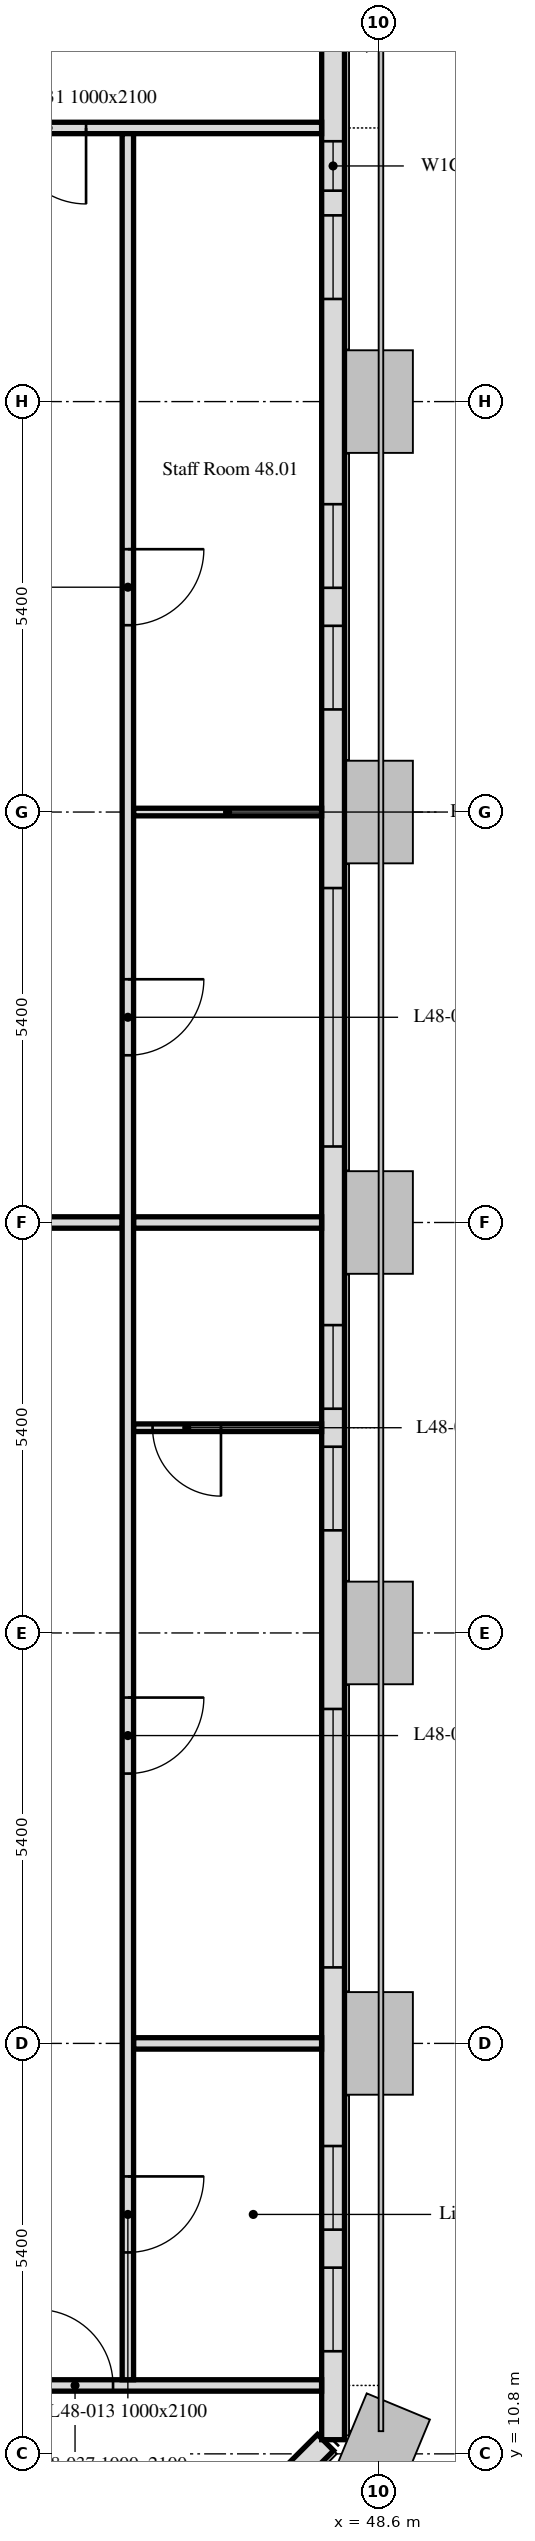
"""IFC4 building model, lengths in metres.
Left out: names, types, materials, properties, quantities, classifications, styles, units other than length and angle.
Written with IfcOpenShell. Run it as: python <this file> out.ifc"""

import sys

from ifc_helpers import new_model, si_unit, direction, frame, frame_2d, origin, place, context, subcontext, project, spatial, rectangle, extrude, element, fill, save


model = new_model("IFC4")
c1 = context("Model", 3, precision=1e-05, world=origin(), true_north=direction((0.0, 1.0)))
c2 = subcontext(c1, "Body", "Model", "MODEL_VIEW")
j1 = project(units=[si_unit("LENGTHUNIT", "METRE"), si_unit("PLANEANGLEUNIT", "RADIAN")], contexts=[c1])
p1 = place(None, origin())
s1 = spatial("IfcSite", under=j1, at=p1, CompositionType="ELEMENT")
p2 = place(p1, origin())
s2 = spatial("IfcBuilding", under=s1, at=p2, CompositionType="ELEMENT")
p3 = place(p2, frame((0.0, 0.0, 197.2)))
s3 = spatial("IfcBuildingStorey", under=s2, at=p3, CompositionType="ELEMENT", Elevation=197.2)
p4 = place(p3, frame((43.051, 6.099, 0.0), z_axis=(0.0, 0.0, 1.0), x_axis=(0.707106781187, 0.707106781187, 0.0)))
e1 = element("IfcWall", 1, at=p4, inside=s3, PredefinedType="SOLIDWALL", context=c2, shape_type="SweptSolid", body=[
    extrude(rectangle(XDim=6.86, YDim=0.3, at=frame_2d((3.43, 0.0))), origin(), (0.0, 0.0, 1.0), 3.0),
])
p5 = place(p4, frame((1.28, 0.0, 0.9)))
e2 = element("IfcOpeningElement", 2, at=p5, cuts=e1, PredefinedType="OPENING", context=c2, shape_type="SweptSolid", body=[
    extrude(rectangle(XDim=1.1, YDim=1.7, at=frame_2d((0.55, 0.85))), frame((0.0, 0.16, 0.0), z_axis=(0.0, -1.0, 0.0), x_axis=(1.0, 0.0, 0.0)), (0.0, 0.0, 1.0), 0.32),
])
p6 = place(p4, frame((4.48, 0.0, 0.9)))
e3 = element("IfcOpeningElement", 3, at=p6, cuts=e1, PredefinedType="OPENING", context=c2, shape_type="SweptSolid", body=[
    extrude(rectangle(XDim=1.1, YDim=1.7, at=frame_2d((0.55, 0.85))), frame((0.0, 0.16, 0.0), z_axis=(0.0, -1.0, 0.0), x_axis=(1.0, 0.0, 0.0)), (0.0, 0.0, 1.0), 0.32),
])
p7 = place(p3, frame((48.0, 10.986, 0.0), z_axis=(0.0, 0.0, 1.0), x_axis=(0.0, 1.0, 0.0)))
e4 = element("IfcWall", 4, at=p7, inside=s3, PredefinedType="SOLIDWALL", context=c2, shape_type="SweptSolid", body=[
    extrude(rectangle(XDim=32.027, YDim=0.3, at=frame_2d((16.014, 0.0))), origin(), (0.0, 0.0, 1.0), 3.0),
])
p8 = place(p7, frame((1.164, 0.0, 0.9)))
e5 = element("IfcOpeningElement", 5, at=p8, cuts=e4, PredefinedType="OPENING", context=c2, shape_type="SweptSolid", body=[
    extrude(rectangle(XDim=1.1, YDim=1.7, at=frame_2d((0.55, 0.85))), frame((0.0, 0.16, 0.0), z_axis=(0.0, -1.0, 0.0), x_axis=(1.0, 0.0, 0.0)), (0.0, 0.0, 1.0), 0.32),
])
p9 = place(p7, frame((2.764, 0.0, 0.9)))
e6 = element("IfcOpeningElement", 6, at=p9, cuts=e4, PredefinedType="OPENING", context=c2, shape_type="SweptSolid", body=[
    extrude(rectangle(XDim=1.1, YDim=1.7, at=frame_2d((0.55, 0.85))), frame((0.0, 0.16, 0.0), z_axis=(0.0, -1.0, 0.0), x_axis=(1.0, 0.0, 0.0)), (0.0, 0.0, 1.0), 0.32),
])
p10 = place(p7, frame((6.214, 0.0, 0.9)))
e7 = element("IfcOpeningElement", 7, at=p10, cuts=e4, PredefinedType="OPENING", context=c2, shape_type="SweptSolid", body=[
    extrude(rectangle(XDim=3.4, YDim=1.7, at=frame_2d((1.7, 0.85))), frame((0.0, 0.16, 0.0), z_axis=(0.0, -1.0, 0.0), x_axis=(1.0, 0.0, 0.0)), (0.0, 0.0, 1.0), 0.32),
])
p11 = place(p7, frame((11.964, 0.0, 0.9)))
e8 = element("IfcOpeningElement", 8, at=p11, cuts=e4, PredefinedType="OPENING", context=c2, shape_type="SweptSolid", body=[
    extrude(rectangle(XDim=1.1, YDim=1.7, at=frame_2d((0.55, 0.85))), frame((0.0, 0.16, 0.0), z_axis=(0.0, -1.0, 0.0), x_axis=(1.0, 0.0, 0.0)), (0.0, 0.0, 1.0), 0.32),
])
p12 = place(p7, frame((13.564, 0.0, 0.9)))
e9 = element("IfcOpeningElement", 9, at=p12, cuts=e4, PredefinedType="OPENING", context=c2, shape_type="SweptSolid", body=[
    extrude(rectangle(XDim=1.1, YDim=1.7, at=frame_2d((0.55, 0.85))), frame((0.0, 0.16, 0.0), z_axis=(0.0, -1.0, 0.0), x_axis=(1.0, 0.0, 0.0)), (0.0, 0.0, 1.0), 0.32),
])
p13 = place(p7, frame((17.014, 0.0, 0.9)))
e10 = element("IfcOpeningElement", 10, at=p13, cuts=e4, PredefinedType="OPENING", context=c2, shape_type="SweptSolid", body=[
    extrude(rectangle(XDim=3.4, YDim=1.7, at=frame_2d((1.7, 0.85))), frame((0.0, 0.16, 0.0), z_axis=(0.0, -1.0, 0.0), x_axis=(1.0, 0.0, 0.0)), (0.0, 0.0, 1.0), 0.32),
])
p14 = place(p7, frame((22.764, 0.0, 0.9)))
e11 = element("IfcOpeningElement", 11, at=p14, cuts=e4, PredefinedType="OPENING", context=c2, shape_type="SweptSolid", body=[
    extrude(rectangle(XDim=1.1, YDim=1.7, at=frame_2d((0.55, 0.85))), frame((0.0, 0.16, 0.0), z_axis=(0.0, -1.0, 0.0), x_axis=(1.0, 0.0, 0.0)), (0.0, 0.0, 1.0), 0.32),
])
p15 = place(p7, frame((24.364, 0.0, 0.9)))
e12 = element("IfcOpeningElement", 12, at=p15, cuts=e4, PredefinedType="OPENING", context=c2, shape_type="SweptSolid", body=[
    extrude(rectangle(XDim=1.1, YDim=1.7, at=frame_2d((0.55, 0.85))), frame((0.0, 0.16, 0.0), z_axis=(0.0, -1.0, 0.0), x_axis=(1.0, 0.0, 0.0)), (0.0, 0.0, 1.0), 0.32),
])
p16 = place(p7, frame((28.164, 0.0, 0.9)))
e13 = element("IfcOpeningElement", 13, at=p16, cuts=e4, PredefinedType="OPENING", context=c2, shape_type="SweptSolid", body=[
    extrude(rectangle(XDim=1.1, YDim=1.7, at=frame_2d((0.55, 0.85))), frame((0.0, 0.16, 0.0), z_axis=(0.0, -1.0, 0.0), x_axis=(1.0, 0.0, 0.0)), (0.0, 0.0, 1.0), 0.32),
])
p17 = place(p7, frame((29.589, 0.0, 0.9)))
e14 = element("IfcOpeningElement", 14, at=p17, cuts=e4, PredefinedType="OPENING", context=c2, shape_type="SweptSolid", body=[
    extrude(rectangle(XDim=0.65, YDim=1.7, at=frame_2d((0.325, 0.85))), frame((0.0, 0.16, 0.0), z_axis=(0.0, -1.0, 0.0), x_axis=(1.0, 0.0, 0.0)), (0.0, 0.0, 1.0), 0.32),
])
p18 = place(p3, frame((45.375, 32.4, 0.0), z_axis=(0.0, 0.0, 1.0), x_axis=(1.0, 0.0, 0.0)))
e15 = element("IfcWall", 15, at=p18, inside=s3, PredefinedType="PARTITIONING", context=c2, shape_type="SweptSolid", body=[
    extrude(rectangle(XDim=2.474, YDim=0.1, at=frame_2d((1.237, 0.0))), origin(), (0.0, 0.0, 1.0), 2.4),
])
p19 = place(p3, frame((47.849, 41.4, 0.0), z_axis=(0.0, 0.0, 1.0), x_axis=(-1.0, 0.0, 0.0)))
e16 = element("IfcWall", 16, at=p19, inside=s3, PredefinedType="PARTITIONING", context=c2, shape_type="SweptSolid", body=[
    extrude(rectangle(XDim=41.698, YDim=0.15, at=frame_2d((20.849, 0.0))), origin(), (0.0, 0.0, 1.0), 2.4),
])
p20 = place(p19, frame((39.249, 0.0, 0.0)))
e17 = element("IfcOpeningElement", 17, at=p20, cuts=e16, PredefinedType="OPENING", context=c2, shape_type="SweptSolid", body=[
    extrude(rectangle(XDim=1.0, YDim=2.1, at=frame_2d((0.5, 1.05))), frame((0.0, 0.075, 0.0), z_axis=(0.0, -1.0, 0.0), x_axis=(1.0, 0.0, 0.0)), (0.0, 0.0, 1.0), 0.15),
])
p21 = place(p19, frame((11.449, 0.0, 0.0)))
e18 = element("IfcOpeningElement", 18, at=p21, cuts=e16, PredefinedType="OPENING", context=c2, shape_type="SweptSolid", body=[
    extrude(rectangle(XDim=1.0, YDim=2.1, at=frame_2d((0.5, 1.05))), frame((0.0, 0.075, 0.0), z_axis=(0.0, -1.0, 0.0), x_axis=(1.0, 0.0, 0.0)), (0.0, 0.0, 1.0), 0.15),
])
p22 = place(p19, frame((3.099, 0.0, 0.0)))
e19 = element("IfcOpeningElement", 19, at=p22, cuts=e16, PredefinedType="OPENING", context=c2, shape_type="SweptSolid", body=[
    extrude(rectangle(XDim=1.0, YDim=2.1, at=frame_2d((0.5, 1.05))), frame((0.0, 0.075, 0.0), z_axis=(0.0, -1.0, 0.0), x_axis=(1.0, 0.0, 0.0)), (0.0, 0.0, 1.0), 0.15),
])
p23 = place(p19, frame((23.049, 0.0, 0.0)))
e20 = element("IfcOpeningElement", 20, at=p23, cuts=e16, PredefinedType="OPENING", context=c2, shape_type="SweptSolid", body=[
    extrude(rectangle(XDim=1.0, YDim=2.1, at=frame_2d((0.5, 1.05))), frame((0.0, 0.075, 0.0), z_axis=(0.0, -1.0, 0.0), x_axis=(1.0, 0.0, 0.0)), (0.0, 0.0, 1.0), 0.15),
])
p24 = place(p3, frame((45.375, 27.0, 0.0), z_axis=(0.0, 0.0, 1.0), x_axis=(1.0, 0.0, 0.0)))
e21 = element("IfcWall", 21, at=p24, inside=s3, PredefinedType="PARTITIONING", context=c2, shape_type="SweptSolid", body=[
    extrude(rectangle(XDim=2.474, YDim=0.15, at=frame_2d((1.237, 0.0))), origin(), (0.0, 0.0, 1.0), 2.4),
])
p25 = place(p3, frame((43.2, 27.0, 0.0), z_axis=(0.0, 0.0, 1.0), x_axis=(1.0, 0.0, 0.0)))
e22 = element("IfcWall", 22, at=p25, inside=s3, PredefinedType="PARTITIONING", context=c2, shape_type="SweptSolid", body=[
    extrude(rectangle(XDim=2.025, YDim=0.15, at=frame_2d((1.013, 0.0))), origin(), (0.0, 0.0, 1.0), 2.4),
])
p26 = place(p3, frame((47.849, 16.2, 0.0), z_axis=(0.0, 0.0, 1.0), x_axis=(-1.0, 0.0, 0.0)))
e23 = element("IfcWall", 23, at=p26, inside=s3, PredefinedType="PARTITIONING", context=c2, shape_type="SweptSolid", body=[
    extrude(rectangle(XDim=2.474, YDim=0.15, at=frame_2d((1.237, 0.0))), origin(), (0.0, 0.0, 1.0), 2.4),
])
p27 = place(p3, frame((6.151, 11.7, 0.0), z_axis=(0.0, 0.0, 1.0), x_axis=(1.0, 0.0, 0.0)))
e24 = element("IfcWall", 24, at=p27, inside=s3, PredefinedType="PARTITIONING", context=c2, shape_type="SweptSolid", body=[
    extrude(rectangle(XDim=41.698, YDim=0.15, at=frame_2d((20.849, 0.0))), origin(), (0.0, 0.0, 1.0), 3.0),
])
p28 = place(p27, frame((17.649, 0.0, 0.0)))
e25 = element("IfcOpeningElement", 25, at=p28, cuts=e24, PredefinedType="OPENING", context=c2, shape_type="SweptSolid", body=[
    extrude(rectangle(XDim=1.0, YDim=2.1, at=frame_2d((0.5, 1.05))), frame((0.0, 0.075, 0.0), z_axis=(0.0, -1.0, 0.0), x_axis=(1.0, 0.0, 0.0)), (0.0, 0.0, 1.0), 0.15),
])
p29 = place(p27, frame((1.449, 0.0, 0.0)))
e26 = element("IfcOpeningElement", 26, at=p29, cuts=e24, PredefinedType="OPENING", context=c2, shape_type="SweptSolid", body=[
    extrude(rectangle(XDim=1.0, YDim=2.1, at=frame_2d((0.5, 1.05))), frame((0.0, 0.075, 0.0), z_axis=(0.0, -1.0, 0.0), x_axis=(1.0, 0.0, 0.0)), (0.0, 0.0, 1.0), 0.15),
])
p30 = place(p27, frame((29.249, 0.0, 0.0)))
e27 = element("IfcOpeningElement", 27, at=p30, cuts=e24, PredefinedType="OPENING", context=c2, shape_type="SweptSolid", body=[
    extrude(rectangle(XDim=1.0, YDim=2.1, at=frame_2d((0.5, 1.05))), frame((0.0, 0.075, 0.0), z_axis=(0.0, -1.0, 0.0), x_axis=(1.0, 0.0, 0.0)), (0.0, 0.0, 1.0), 0.15),
])
p31 = place(p27, frame((37.954, 0.0, 0.0)))
e28 = element("IfcOpeningElement", 28, at=p31, cuts=e24, PredefinedType="OPENING", context=c2, shape_type="SweptSolid", body=[
    extrude(rectangle(XDim=1.0, YDim=2.1, at=frame_2d((0.5, 1.05))), frame((0.0, 0.075, 0.0), z_axis=(0.0, -1.0, 0.0), x_axis=(1.0, 0.0, 0.0)), (0.0, 0.0, 1.0), 0.15),
])
p32 = place(p3, frame((47.849, 24.3, 0.0), z_axis=(0.0, 0.0, 1.0), x_axis=(-1.0, 0.0, 0.0)))
e29 = element("IfcWall", 29, at=p32, inside=s3, PredefinedType="PARTITIONING", context=c2, shape_type="SweptSolid", body=[
    extrude(rectangle(XDim=2.474, YDim=0.1, at=frame_2d((1.237, 0.0))), origin(), (0.0, 0.0, 1.0), 3.0),
])
p33 = place(p32, frame((1.324, 0.0, 0.0)))
e30 = element("IfcOpeningElement", 30, at=p33, cuts=e29, PredefinedType="OPENING", context=c2, shape_type="SweptSolid", body=[
    extrude(rectangle(XDim=0.9, YDim=2.1, at=frame_2d((0.45, 1.05))), frame((0.0, 0.05, 0.0), z_axis=(0.0, -1.0, 0.0), x_axis=(1.0, 0.0, 0.0)), (0.0, 0.0, 1.0), 0.1),
])
p34 = place(p3, frame((45.3, 41.325, 0.0), z_axis=(0.0, 0.0, 1.0), x_axis=(0.0, -1.0, 0.0)))
e31 = element("IfcWall", 31, at=p34, inside=s3, PredefinedType="PARTITIONING", context=c2, shape_type="SweptSolid", body=[
    extrude(rectangle(XDim=29.55, YDim=0.15, at=frame_2d((14.775, 0.0))), origin(), (0.0, 0.0, 1.0), 2.4),
])
p35 = place(p34, frame((5.467, 0.0, 0.0)))
e32 = element("IfcOpeningElement", 32, at=p35, cuts=e31, PredefinedType="OPENING", context=c2, shape_type="SweptSolid", body=[
    extrude(rectangle(XDim=1.0, YDim=2.1, at=frame_2d((0.5, 1.05))), frame((0.0, 0.075, 0.0), z_axis=(0.0, -1.0, 0.0), x_axis=(1.0, 0.0, 0.0)), (0.0, 0.0, 1.0), 0.15),
])
p36 = place(p34, frame((11.125, 0.0, 0.0)))
e33 = element("IfcOpeningElement", 33, at=p36, cuts=e31, PredefinedType="OPENING", context=c2, shape_type="SweptSolid", body=[
    extrude(rectangle(XDim=1.0, YDim=2.1, at=frame_2d((0.5, 1.05))), frame((0.0, 0.075, 0.0), z_axis=(0.0, -1.0, 0.0), x_axis=(1.0, 0.0, 0.0)), (0.0, 0.0, 1.0), 0.15),
])
p37 = place(p34, frame((26.875, 0.0, 0.0)))
e34 = element("IfcOpeningElement", 34, at=p37, cuts=e31, PredefinedType="OPENING", context=c2, shape_type="SweptSolid", body=[
    extrude(rectangle(XDim=1.0, YDim=2.1, at=frame_2d((0.5, 1.05))), frame((0.0, 0.075, 0.0), z_axis=(0.0, -1.0, 0.0), x_axis=(1.0, 0.0, 0.0)), (0.0, 0.0, 1.0), 0.15),
])
p38 = place(p34, frame((20.575, 0.0, 0.0)))
e35 = element("IfcOpeningElement", 35, at=p38, cuts=e31, PredefinedType="OPENING", context=c2, shape_type="SweptSolid", body=[
    extrude(rectangle(XDim=1.0, YDim=2.1, at=frame_2d((0.5, 1.05))), frame((0.0, 0.075, 0.0), z_axis=(0.0, -1.0, 0.0), x_axis=(1.0, 0.0, 0.0)), (0.0, 0.0, 1.0), 0.15),
])
p39 = place(p8, origin())
e36 = element("IfcWindow", 36, at=p39, inside=s3, PartitioningType="SINGLE_PANEL", PredefinedType="WINDOW", context=c2, shape_type="SweptSolid", body=[
    extrude(rectangle(XDim=1.1, YDim=1.7, at=frame_2d((0.55, 0.85))), frame((0.0, 0.03, 0.0), z_axis=(0.0, -1.0, 0.0), x_axis=(1.0, 0.0, 0.0)), (0.0, 0.0, 1.0), 0.06),
])
fill(e5, e36)
p40 = place(p9, origin())
e37 = element("IfcWindow", 37, at=p40, inside=s3, PartitioningType="SINGLE_PANEL", PredefinedType="WINDOW", context=c2, shape_type="SweptSolid", body=[
    extrude(rectangle(XDim=1.1, YDim=1.7, at=frame_2d((0.55, 0.85))), frame((0.0, 0.03, 0.0), z_axis=(0.0, -1.0, 0.0), x_axis=(1.0, 0.0, 0.0)), (0.0, 0.0, 1.0), 0.06),
])
fill(e6, e37)
p41 = place(p10, origin())
e38 = element("IfcWindow", 38, at=p41, inside=s3, PartitioningType="SINGLE_PANEL", PredefinedType="WINDOW", context=c2, shape_type="SweptSolid", body=[
    extrude(rectangle(XDim=3.4, YDim=1.7, at=frame_2d((1.7, 0.85))), frame((0.0, 0.03, 0.0), z_axis=(0.0, -1.0, 0.0), x_axis=(1.0, 0.0, 0.0)), (0.0, 0.0, 1.0), 0.06),
])
fill(e7, e38)
p42 = place(p11, origin())
e39 = element("IfcWindow", 39, at=p42, inside=s3, PartitioningType="SINGLE_PANEL", PredefinedType="WINDOW", context=c2, shape_type="SweptSolid", body=[
    extrude(rectangle(XDim=1.1, YDim=1.7, at=frame_2d((0.55, 0.85))), frame((0.0, 0.03, 0.0), z_axis=(0.0, -1.0, 0.0), x_axis=(1.0, 0.0, 0.0)), (0.0, 0.0, 1.0), 0.06),
])
fill(e8, e39)
p43 = place(p12, origin())
e40 = element("IfcWindow", 40, at=p43, inside=s3, PartitioningType="SINGLE_PANEL", PredefinedType="WINDOW", context=c2, shape_type="SweptSolid", body=[
    extrude(rectangle(XDim=1.1, YDim=1.7, at=frame_2d((0.55, 0.85))), frame((0.0, 0.03, 0.0), z_axis=(0.0, -1.0, 0.0), x_axis=(1.0, 0.0, 0.0)), (0.0, 0.0, 1.0), 0.06),
])
fill(e9, e40)
p44 = place(p13, origin())
e41 = element("IfcWindow", 41, at=p44, inside=s3, PartitioningType="SINGLE_PANEL", PredefinedType="WINDOW", context=c2, shape_type="SweptSolid", body=[
    extrude(rectangle(XDim=3.4, YDim=1.7, at=frame_2d((1.7, 0.85))), frame((0.0, 0.03, 0.0), z_axis=(0.0, -1.0, 0.0), x_axis=(1.0, 0.0, 0.0)), (0.0, 0.0, 1.0), 0.06),
])
fill(e10, e41)
p45 = place(p14, origin())
e42 = element("IfcWindow", 42, at=p45, inside=s3, PartitioningType="SINGLE_PANEL", PredefinedType="WINDOW", context=c2, shape_type="SweptSolid", body=[
    extrude(rectangle(XDim=1.1, YDim=1.7, at=frame_2d((0.55, 0.85))), frame((0.0, 0.03, 0.0), z_axis=(0.0, -1.0, 0.0), x_axis=(1.0, 0.0, 0.0)), (0.0, 0.0, 1.0), 0.06),
])
fill(e11, e42)
p46 = place(p15, origin())
e43 = element("IfcWindow", 43, at=p46, inside=s3, PartitioningType="SINGLE_PANEL", PredefinedType="WINDOW", context=c2, shape_type="SweptSolid", body=[
    extrude(rectangle(XDim=1.1, YDim=1.7, at=frame_2d((0.55, 0.85))), frame((0.0, 0.03, 0.0), z_axis=(0.0, -1.0, 0.0), x_axis=(1.0, 0.0, 0.0)), (0.0, 0.0, 1.0), 0.06),
])
fill(e12, e43)
p47 = place(p16, origin())
e44 = element("IfcWindow", 44, at=p47, inside=s3, PartitioningType="SINGLE_PANEL", PredefinedType="WINDOW", context=c2, shape_type="SweptSolid", body=[
    extrude(rectangle(XDim=1.1, YDim=1.7, at=frame_2d((0.55, 0.85))), frame((0.0, 0.03, 0.0), z_axis=(0.0, -1.0, 0.0), x_axis=(1.0, 0.0, 0.0)), (0.0, 0.0, 1.0), 0.06),
])
fill(e13, e44)
p48 = place(p17, origin())
e45 = element("IfcWindow", 45, at=p48, inside=s3, PartitioningType="SINGLE_PANEL", PredefinedType="WINDOW", context=c2, shape_type="SweptSolid", body=[
    extrude(rectangle(XDim=0.65, YDim=1.7, at=frame_2d((0.325, 0.85))), frame((0.0, 0.03, 0.0), z_axis=(0.0, -1.0, 0.0), x_axis=(1.0, 0.0, 0.0)), (0.0, 0.0, 1.0), 0.06),
])
fill(e14, e45)
p49 = place(p35, origin())
e46 = element("IfcDoor", 46, at=p49, inside=s3, OperationType="SINGLE_SWING_LEFT", PredefinedType="DOOR", context=c2, shape_type="SweptSolid", body=[
    extrude(rectangle(XDim=1.0, YDim=2.1, at=frame_2d((0.5, 1.05))), frame((0.0, 0.025, 0.0), z_axis=(0.0, -1.0, 0.0), x_axis=(1.0, 0.0, 0.0)), (0.0, 0.0, 1.0), 0.05),
])
fill(e32, e46)
p50 = place(p36, origin())
e47 = element("IfcDoor", 47, at=p50, inside=s3, OperationType="SINGLE_SWING_RIGHT", PredefinedType="DOOR", context=c2, shape_type="SweptSolid", body=[
    extrude(rectangle(XDim=1.0, YDim=2.1, at=frame_2d((0.5, 1.05))), frame((0.0, 0.025, 0.0), z_axis=(0.0, -1.0, 0.0), x_axis=(1.0, 0.0, 0.0)), (0.0, 0.0, 1.0), 0.05),
])
fill(e33, e47)
p51 = place(p37, origin())
e48 = element("IfcDoor", 48, at=p51, inside=s3, OperationType="SINGLE_SWING_LEFT", PredefinedType="DOOR", context=c2, shape_type="SweptSolid", body=[
    extrude(rectangle(XDim=1.0, YDim=2.1, at=frame_2d((0.5, 1.05))), frame((0.0, 0.025, 0.0), z_axis=(0.0, -1.0, 0.0), x_axis=(1.0, 0.0, 0.0)), (0.0, 0.0, 1.0), 0.05),
])
fill(e34, e48)
p52 = place(p33, origin())
e49 = element("IfcDoor", 49, at=p52, inside=s3, OperationType="SINGLE_SWING_RIGHT", PredefinedType="DOOR", context=c2, shape_type="SweptSolid", body=[
    extrude(rectangle(XDim=0.9, YDim=2.1, at=frame_2d((0.45, 1.05))), frame((0.0, 0.025, 0.0), z_axis=(0.0, -1.0, 0.0), x_axis=(1.0, 0.0, 0.0)), (0.0, 0.0, 1.0), 0.05),
])
fill(e30, e49)
p53 = place(p22, origin())
e50 = element("IfcDoor", 50, at=p53, inside=s3, OperationType="SINGLE_SWING_LEFT", PredefinedType="DOOR", context=c2, shape_type="SweptSolid", body=[
    extrude(rectangle(XDim=1.0, YDim=2.1, at=frame_2d((0.5, 1.05))), frame((0.0, 0.025, 0.0), z_axis=(0.0, -1.0, 0.0), x_axis=(1.0, 0.0, 0.0)), (0.0, 0.0, 1.0), 0.05),
])
fill(e19, e50)
p54 = place(p31, origin())
e51 = element("IfcDoor", 51, at=p54, inside=s3, OperationType="SINGLE_SWING_LEFT", PredefinedType="DOOR", context=c2, shape_type="SweptSolid", body=[
    extrude(rectangle(XDim=1.0, YDim=2.1, at=frame_2d((0.5, 1.05))), frame((0.0, 0.025, 0.0), z_axis=(0.0, -1.0, 0.0), x_axis=(1.0, 0.0, 0.0)), (0.0, 0.0, 1.0), 0.05),
])
fill(e28, e51)
p55 = place(p38, origin())
e52 = element("IfcDoor", 52, at=p55, inside=s3, OperationType="SINGLE_SWING_LEFT", PredefinedType="DOOR", context=c2, shape_type="SweptSolid", body=[
    extrude(rectangle(XDim=1.0, YDim=2.1, at=frame_2d((0.5, 1.05))), frame((0.0, 0.025, 0.0), z_axis=(0.0, -1.0, 0.0), x_axis=(1.0, 0.0, 0.0)), (0.0, 0.0, 1.0), 0.05),
])
fill(e35, e52)
save(model, sys.argv[1])
